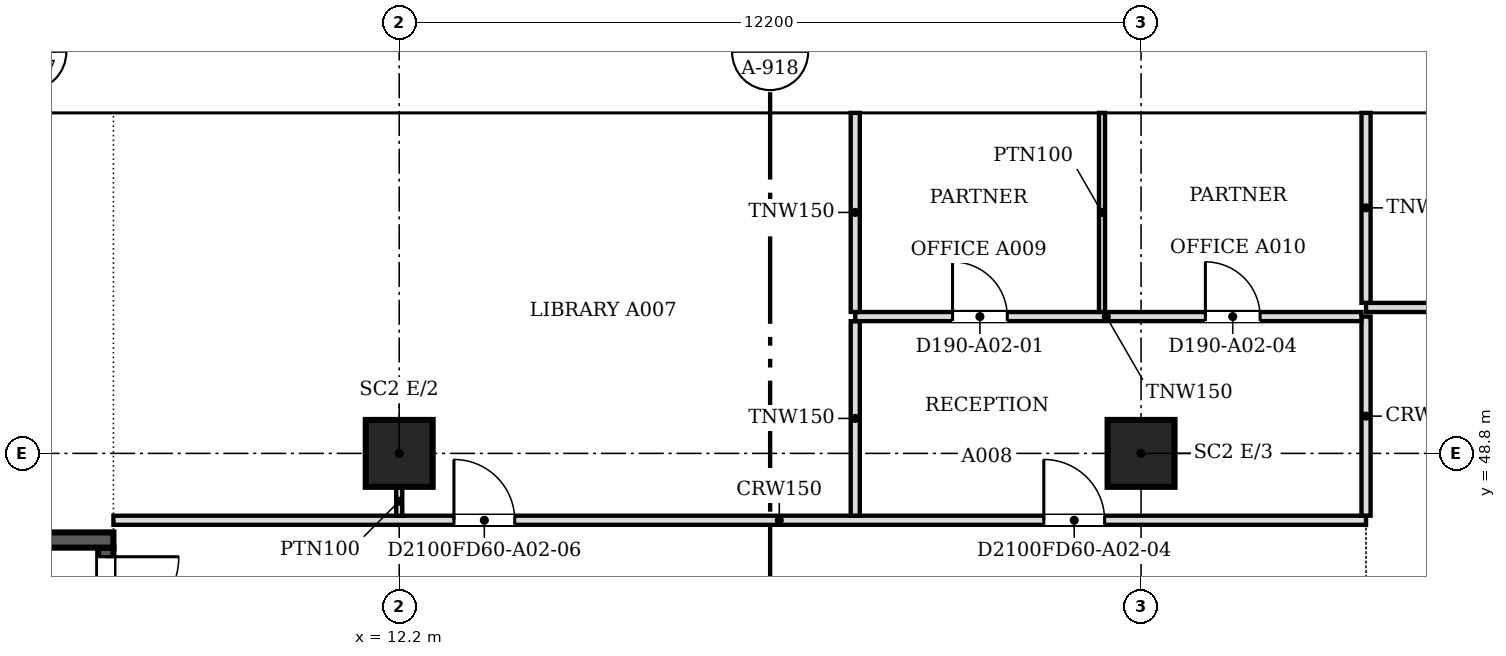
"""IFC4 building model, lengths in metres.
Left out: names, types, materials, properties, quantities, classifications, styles, units other than length and angle.
Written with IfcOpenShell. Run it as: python <this file> out.ifc"""

import sys

from ifc_helpers import new_model, si_unit, direction, frame, frame_2d, origin, origin_2d, place, context, subcontext, project, spatial, polyline, rectangle, outline, extrude, faceted_brep, source, transform, mapped, element, fill, save


model = new_model("IFC4")
c1 = context("Model", 3, precision=1e-05, world=origin(), true_north=direction((0.0, 1.0)))
c2 = subcontext(c1, "Body", "Model", "MODEL_VIEW")
j1 = project(units=[si_unit("LENGTHUNIT", "METRE"), si_unit("PLANEANGLEUNIT", "RADIAN")], contexts=[c1])
p1 = place(None, origin())
s1 = spatial("IfcSite", under=j1, at=p1, CompositionType="ELEMENT")
p2 = place(p1, origin())
s2 = spatial("IfcBuilding", under=s1, at=p2, CompositionType="ELEMENT")
p3 = place(p2, frame((0.0, 0.0, 33.4)))
s3 = spatial("IfcBuildingStorey", under=s2, at=p3, CompositionType="ELEMENT", Elevation=33.4)
for number, where, z_axis, x_axis in (
    (1, (12.2, 48.8, 0.0), (0.0, 0.0, 1.0), (1.0, 0.0, 0.0)),
    (2, (24.4, 48.8, 0.0), (0.0, 0.0, 1.0), (1.0, 0.0, 0.0)),
):
    element("IfcColumn", number, at=place(p3, frame(where, z_axis=z_axis, x_axis=x_axis)), inside=s3, PredefinedType="COLUMN", context=c2, shape_type="SweptSolid", body=[
        extrude(rectangle(XDim=1.1, YDim=1.1, at=origin_2d()), origin(), (0.0, 0.0, 1.0), 3.6),
    ])
m1 = source(origin(), c2, "Body", "SweptSolid", [
    extrude(outline(polyline([(3.05, 0.0), (6.1, 3.8), (3.05, 7.6), (0.0, 3.8), (3.05, 0.0)])), frame((0.0, 0.25, 0.0), z_axis=(0.0, -1.0, 0.0), x_axis=(1.0, 0.0, 0.0)), (0.0, 0.0, 1.0), 0.5),
])
p4 = place(p3, frame((33.55, 54.65, -3.8), z_axis=(0.0, 0.0, 1.0), x_axis=(-1.0, 0.0, 0.0)))
e3 = element("IfcWall", 3, at=p4, inside=s3, PredefinedType="SOLIDWALL", context=c2, shape_type="MappedRepresentation", body=[
    mapped(m1, transform((0.0, 0.0, 0.0), scale=1.0)),
])
m2 = source(origin(), c2, "Body", "SweptSolid", [
    extrude(outline(polyline([(3.05, 0.399), (5.78, 3.8), (3.05, 7.2), (0.321, 3.8), (3.05, 0.399)])), frame((0.0, 0.26, 0.0), z_axis=(0.0, -1.0, 0.0), x_axis=(1.0, 0.0, 0.0)), (0.0, 0.0, 1.0), 0.52),
])
p5 = place(p4, origin())
e4 = element("IfcOpeningElement", 4, at=p5, cuts=e3, PredefinedType="OPENING", context=c2, shape_type="MappedRepresentation", body=[
    mapped(m2, transform((0.0, 0.0, 0.0), scale=1.0)),
])
m3 = source(origin(), c2, "Body", "Brep", [
    faceted_brep([(3.05, -0.25, 0.0), (6.1, -0.25, 3.8), (6.1, -0.25, 3.8), (3.05, -0.25, 7.6), (0.0, -0.25, 3.8), (0.0, 0.25, 3.8), (3.05, 0.25, 7.6), (6.1, 0.25, 3.8), (6.1, 0.25, 3.8), (3.05, 0.25, 0.0)], [[[0, 1, 2, 3, 4]], [[5, 6, 7, 8, 9]], [[9, 8, 1, 0]], [[7, 6, 3, 2]], [[6, 5, 4, 3]], [[5, 9, 0, 4]], [[1, 8, 7, 2]]]),
])
p6 = place(p3, frame((27.45, 54.65, -3.8), z_axis=(0.0, 0.0, 1.0), x_axis=(-1.0, 0.0, 0.0)))
e5 = element("IfcWall", 5, at=p6, inside=s3, PredefinedType="SOLIDWALL", context=c2, shape_type="MappedRepresentation", body=[
    mapped(m3, transform((0.0, 0.0, 0.0), scale=1.0)),
])
p7 = place(p6, origin())
e6 = element("IfcOpeningElement", 6, at=p7, cuts=e5, PredefinedType="OPENING", context=c2, shape_type="MappedRepresentation", body=[
    mapped(m2, transform((0.0, 0.0, 0.0), scale=1.0)),
])
p8 = place(p3, frame((21.35, 54.65, -3.8), z_axis=(0.0, 0.0, 1.0), x_axis=(-1.0, 0.0, 0.0)))
e7 = element("IfcWall", 7, at=p8, inside=s3, PredefinedType="SOLIDWALL", context=c2, shape_type="MappedRepresentation", body=[
    mapped(m1, transform((0.0, 0.0, 0.0), scale=1.0)),
])
p9 = place(p8, origin())
e8 = element("IfcOpeningElement", 8, at=p9, cuts=e7, PredefinedType="OPENING", context=c2, shape_type="MappedRepresentation", body=[
    mapped(m2, transform((0.0, 0.0, 0.0), scale=1.0)),
])
p10 = place(p3, frame((15.25, 54.65, -3.8), z_axis=(0.0, 0.0, 1.0), x_axis=(-1.0, 0.0, 0.0)))
e9 = element("IfcWall", 9, at=p10, inside=s3, PredefinedType="SOLIDWALL", context=c2, shape_type="MappedRepresentation", body=[
    mapped(m1, transform((0.0, 0.0, 0.0), scale=1.0)),
])
p11 = place(p10, origin())
e10 = element("IfcOpeningElement", 10, at=p11, cuts=e9, PredefinedType="OPENING", context=c2, shape_type="MappedRepresentation", body=[
    mapped(m2, transform((0.0, 0.0, 0.0), scale=1.0)),
])
m4 = source(origin(), c2, "Body", "Brep", [
    faceted_brep([(3.003, -0.25, 0.0), (3.05, -0.25, 0.06), (3.05, -0.25, 7.54), (3.003, -0.25, 7.6), (0.0, -0.25, 3.8), (0.0, 0.25, 3.8), (2.957, 0.25, 7.541), (2.957, 0.25, 0.059), (3.003, 0.0, 0.0), (3.003, 0.0, 7.6)], [[[0, 1, 2, 3, 4]], [[5, 6, 7]], [[1, 0, 8]], [[9, 3, 2]], [[6, 5, 4, 3, 9]], [[5, 7, 8, 0, 4]], [[1, 8, 7, 6, 9, 2]]]),
])
p12 = place(p3, frame((9.15, 54.65, -3.8), z_axis=(0.0, 0.0, 1.0), x_axis=(-1.0, 0.0, 0.0)))
e11 = element("IfcWall", 11, at=p12, inside=s3, PredefinedType="SOLIDWALL", context=c2, shape_type="MappedRepresentation", body=[
    mapped(m4, transform((0.0, 0.0, 0.0), scale=1.0)),
])
m5 = source(origin(), c2, "Body", "SweptSolid", [
    extrude(outline(polyline([(2.803, 6.944), (0.319, 3.8), (2.803, 0.656), (2.803, 6.944)])), frame((0.0, 0.26, 0.0), z_axis=(0.0, -1.0, 0.0), x_axis=(1.0, 0.0, 0.0)), (0.0, 0.0, 1.0), 0.52),
])
p13 = place(p12, origin())
e12 = element("IfcOpeningElement", 12, at=p13, cuts=e11, PredefinedType="OPENING", context=c2, shape_type="MappedRepresentation", body=[
    mapped(m5, transform((0.0, 0.0, 0.0), scale=1.0)),
])
p14 = place(p2, frame((0.0, 0.0, 37.2)))
s4 = spatial("IfcBuildingStorey", under=s2, at=p14, CompositionType="ELEMENT", Elevation=37.2)
m6 = source(origin(), c2, "Body", "SweptSolid", [
    extrude(outline(polyline([(3.05, 0.0), (6.1, 3.8), (3.05, 7.6), (0.0, 3.8), (3.05, 0.0)])), frame((0.0, 0.25, 0.0), z_axis=(0.0, -1.0, 0.0), x_axis=(1.0, 0.0, 0.0)), (0.0, 0.0, 1.0), 0.5),
])
p15 = place(p14, frame((30.5, 54.65, -3.8), z_axis=(0.0, 0.0, 1.0), x_axis=(-1.0, 0.0, 0.0)))
e13 = element("IfcWall", 13, at=p15, inside=s4, PredefinedType="SOLIDWALL", context=c2, shape_type="MappedRepresentation", body=[
    mapped(m6, transform((0.0, 0.0, 0.0), scale=1.0)),
])
m7 = source(origin(), c2, "Body", "SweptSolid", [
    extrude(outline(polyline([(3.05, 0.399), (5.78, 3.8), (3.05, 7.201), (0.321, 3.8), (3.05, 0.399)])), frame((0.0, 0.26, 0.0), z_axis=(0.0, -1.0, 0.0), x_axis=(1.0, 0.0, 0.0)), (0.0, 0.0, 1.0), 0.52),
])
p16 = place(p15, origin())
e14 = element("IfcOpeningElement", 14, at=p16, cuts=e13, PredefinedType="OPENING", context=c2, shape_type="MappedRepresentation", body=[
    mapped(m7, transform((0.0, 0.0, 0.0), scale=1.0)),
])
m8 = source(origin(), c2, "Body", "Brep", [
    faceted_brep([(3.05, -0.25, 0.0), (6.1, -0.25, 3.8), (6.1, -0.25, 3.8), (3.05, -0.25, 7.6), (0.0, -0.25, 3.8), (0.0, 0.25, 3.8), (3.05, 0.25, 7.6), (6.1, 0.25, 3.8), (6.1, 0.25, 3.8), (3.05, 0.25, 0.0)], [[[0, 1, 2, 3, 4]], [[5, 6, 7, 8, 9]], [[9, 8, 1, 0]], [[7, 6, 3, 2]], [[6, 5, 4, 3]], [[5, 9, 0, 4]], [[1, 8, 7, 2]]]),
])
p17 = place(p14, frame((24.4, 54.65, -3.8), z_axis=(0.0, 0.0, 1.0), x_axis=(-1.0, 0.0, 0.0)))
e15 = element("IfcWall", 15, at=p17, inside=s4, PredefinedType="SOLIDWALL", context=c2, shape_type="MappedRepresentation", body=[
    mapped(m8, transform((0.0, 0.0, 0.0), scale=1.0)),
])
p18 = place(p17, origin())
e16 = element("IfcOpeningElement", 16, at=p18, cuts=e15, PredefinedType="OPENING", context=c2, shape_type="MappedRepresentation", body=[
    mapped(m7, transform((0.0, 0.0, 0.0), scale=1.0)),
])
p19 = place(p14, frame((18.3, 54.65, -3.8), z_axis=(0.0, 0.0, 1.0), x_axis=(-1.0, 0.0, 0.0)))
e17 = element("IfcWall", 17, at=p19, inside=s4, PredefinedType="SOLIDWALL", context=c2, shape_type="MappedRepresentation", body=[
    mapped(m6, transform((0.0, 0.0, 0.0), scale=1.0)),
])
p20 = place(p19, origin())
e18 = element("IfcOpeningElement", 18, at=p20, cuts=e17, PredefinedType="OPENING", context=c2, shape_type="MappedRepresentation", body=[
    mapped(m7, transform((0.0, 0.0, 0.0), scale=1.0)),
])
m9 = source(origin(), c2, "Body", "Brep", [
    faceted_brep([(3.05, -0.25, 0.0), (6.053, -0.25, 3.8), (3.05, -0.25, 7.6), (0.0, -0.25, 3.8), (0.0, 0.25, 3.8), (3.05, 0.25, 7.6), (6.007, 0.25, 3.859), (6.007, 0.25, 3.741), (3.05, 0.25, 0.0), (6.053, 0.0, 3.8)], [[[0, 1, 2, 3]], [[4, 5, 6, 7, 8]], [[8, 7, 9, 1, 0]], [[6, 5, 2, 1, 9]], [[5, 4, 3, 2]], [[4, 8, 0, 3]], [[9, 7, 6]]]),
])
p21 = place(p14, frame((12.2, 54.65, -3.8), z_axis=(0.0, 0.0, 1.0), x_axis=(-1.0, 0.0, 0.0)))
e19 = element("IfcWall", 19, at=p21, inside=s4, PredefinedType="SOLIDWALL", context=c2, shape_type="MappedRepresentation", body=[
    mapped(m9, transform((0.0, 0.0, 0.0), scale=1.0)),
])
m10 = source(origin(), c2, "Body", "SweptSolid", [
    extrude(outline(polyline([(3.049, 0.401), (5.735, 3.8), (3.049, 7.199), (0.321, 3.8), (3.049, 0.401)])), frame((0.0, 0.26, 0.0), z_axis=(0.0, -1.0, 0.0), x_axis=(1.0, 0.0, 0.0)), (0.0, 0.0, 1.0), 0.52),
])
p22 = place(p21, origin())
e20 = element("IfcOpeningElement", 20, at=p22, cuts=e19, PredefinedType="OPENING", context=c2, shape_type="MappedRepresentation", body=[
    mapped(m10, transform((0.0, 0.0, 0.0), scale=1.0)),
])
p23 = place(p3, frame((3.6, 47.375, 0.0), z_axis=(0.0, 0.0, 1.0), x_axis=(1.0, 0.0, 0.0)))
e21 = element("IfcWall", 21, at=p23, inside=s3, PredefinedType="SOLIDWALL", context=c2, shape_type="SweptSolid", body=[
    extrude(rectangle(XDim=3.9, YDim=0.25, at=frame_2d((1.95, 0.0))), origin(), (0.0, 0.0, 1.0), 3.8),
])
p24 = place(p3, frame((7.375, 47.25, 0.0), z_axis=(0.0, 0.0, 1.0), x_axis=(0.0, -1.0, 0.0)))
e22 = element("IfcWall", 22, at=p24, inside=s3, PredefinedType="SOLIDWALL", context=c2, shape_type="SweptSolid", body=[
    extrude(rectangle(XDim=8.0, YDim=0.25, at=frame_2d((4.0, 0.0))), origin(), (0.0, 0.0, 1.0), 3.8),
])
m11 = source(origin(), c2, "Body", "SweptSolid", [
    extrude(rectangle(XDim=1.2, YDim=2.1, at=frame_2d((0.6, 1.05))), frame((0.0, 0.135, 0.0), z_axis=(0.0, -1.0, 0.0), x_axis=(1.0, 0.0, 0.0)), (0.0, 0.0, 1.0), 0.27),
])
p25 = place(p24, frame((0.15, 0.0, 0.0)))
e23 = element("IfcOpeningElement", 23, at=p25, cuts=e22, PredefinedType="OPENING", context=c2, shape_type="MappedRepresentation", body=[
    mapped(m11, transform((0.0, 0.0, 0.0), scale=1.0)),
])
p26 = place(p3, frame((7.5, 47.7, 0.0), z_axis=(0.0, 0.0, 1.0), x_axis=(1.0, 0.0, 0.0)))
e24 = element("IfcWall", 24, at=p26, inside=s3, PredefinedType="PARTITIONING", context=c2, shape_type="SweptSolid", body=[
    extrude(rectangle(XDim=20.6, YDim=0.15, at=frame_2d((10.3, 0.0))), origin(), (0.0, 0.0, 1.0), 3.067),
])
m12 = source(origin(), c2, "Body", "SweptSolid", [
    extrude(rectangle(XDim=1.0, YDim=2.1, at=frame_2d((0.5, 1.05))), frame((0.0, 0.085, 0.0), z_axis=(0.0, -1.0, 0.0), x_axis=(1.0, 0.0, 0.0)), (0.0, 0.0, 1.0), 0.17),
])
p27 = place(p26, frame((15.301, 0.0, 0.0)))
e25 = element("IfcOpeningElement", 25, at=p27, cuts=e24, PredefinedType="OPENING", context=c2, shape_type="MappedRepresentation", body=[
    mapped(m12, transform((0.0, 0.0, 0.0), scale=1.0)),
])
p28 = place(p26, frame((5.6, 0.0, 0.0)))
e26 = element("IfcOpeningElement", 26, at=p28, cuts=e24, PredefinedType="OPENING", context=c2, shape_type="MappedRepresentation", body=[
    mapped(m12, transform((0.0, 0.0, 0.0), scale=1.0)),
])
p29 = place(p3, frame((19.7, 47.776, 0.0), z_axis=(0.0, 0.0, 1.0), x_axis=(0.0, 1.0, 0.0)))
e27 = element("IfcWall", 27, at=p29, inside=s3, PredefinedType="PARTITIONING", context=c2, shape_type="SweptSolid", body=[
    extrude(rectangle(XDim=3.198, YDim=0.15, at=frame_2d((1.599, 0.0))), origin(), (0.0, 0.0, 1.0), 3.067),
])
p30 = place(p3, frame((28.1, 47.776, 0.0), z_axis=(0.0, 0.0, 1.0), x_axis=(0.0, 1.0, 0.0)))
e28 = element("IfcWall", 28, at=p30, inside=s3, PredefinedType="PARTITIONING", context=c2, shape_type="SweptSolid", body=[
    extrude(rectangle(XDim=3.274, YDim=0.15, at=frame_2d((1.637, 0.0))), origin(), (0.0, 0.0, 1.0), 3.067),
])
p31 = place(p3, frame((12.2, 48.25, 0.0), z_axis=(0.0, 0.0, 1.0), x_axis=(0.0, -1.0, 0.0)))
e29 = element("IfcWall", 29, at=p31, inside=s3, PredefinedType="PARTITIONING", context=c2, shape_type="SweptSolid", body=[
    extrude(rectangle(XDim=0.475, YDim=0.1, at=frame_2d((0.238, 0.0))), origin(), (0.0, 0.0, 1.0), 3.067),
])
p32 = place(p3, frame((19.7, 51.05, 0.0), z_axis=(0.0, 0.0, 1.0), x_axis=(1.0, 0.0, 0.0)))
e30 = element("IfcWall", 30, at=p32, inside=s3, PredefinedType="PARTITIONING", context=c2, shape_type="SweptSolid", body=[
    extrude(rectangle(XDim=8.324, YDim=0.15, at=frame_2d((4.162, 0.0))), origin(), (0.0, 0.0, 1.0), 3.067),
])
m13 = source(origin(), c2, "Body", "SweptSolid", [
    extrude(rectangle(XDim=0.9, YDim=2.1, at=frame_2d((0.45, 1.05))), frame((0.0, 0.085, 0.0), z_axis=(0.0, -1.0, 0.0), x_axis=(1.0, 0.0, 0.0)), (0.0, 0.0, 1.0), 0.17),
])
p33 = place(p32, frame((1.6, 0.0, 0.0)))
e31 = element("IfcOpeningElement", 31, at=p33, cuts=e30, PredefinedType="OPENING", context=c2, shape_type="MappedRepresentation", body=[
    mapped(m13, transform((0.0, 0.0, 0.0), scale=1.0)),
])
p34 = place(p32, frame((5.758, 0.0, 0.0)))
e32 = element("IfcOpeningElement", 32, at=p34, cuts=e30, PredefinedType="OPENING", context=c2, shape_type="MappedRepresentation", body=[
    mapped(m13, transform((0.0, 0.0, 0.0), scale=1.0)),
])
p35 = place(p3, frame((19.7, 51.126, 0.0), z_axis=(0.0, 0.0, 1.0), x_axis=(0.0, 1.0, 0.0)))
e33 = element("IfcWall", 33, at=p35, inside=s3, PredefinedType="PARTITIONING", context=c2, shape_type="SweptSolid", body=[
    extrude(rectangle(XDim=3.274, YDim=0.15, at=frame_2d((1.637, 0.0))), origin(), (0.0, 0.0, 1.0), 3.067),
])
p36 = place(p3, frame((23.758, 51.126, 0.0), z_axis=(0.0, 0.0, 1.0), x_axis=(0.0, 1.0, 0.0)))
e34 = element("IfcWall", 34, at=p36, inside=s3, PredefinedType="PARTITIONING", context=c2, shape_type="SweptSolid", body=[
    extrude(rectangle(XDim=3.274, YDim=0.1, at=frame_2d((1.637, 0.0))), origin(), (0.0, 0.0, 1.0), 3.067),
])
p37 = place(p3, frame((28.1, 51.2, 0.0), z_axis=(0.0, 0.0, 1.0), x_axis=(1.0, 0.0, 0.0)))
e35 = element("IfcWall", 35, at=p37, inside=s3, PredefinedType="PARTITIONING", context=c2, shape_type="SweptSolid", body=[
    extrude(rectangle(XDim=31.438, YDim=0.15, at=frame_2d((15.719, 0.0))), origin(), (0.0, 0.0, 1.0), 3.067),
])
p38 = place(p37, frame((27.501, 0.0, 0.0)))
e36 = element("IfcOpeningElement", 36, at=p38, cuts=e35, PredefinedType="OPENING", context=c2, shape_type="MappedRepresentation", body=[
    mapped(m13, transform((0.0, 0.0, 0.0), scale=1.0)),
])
p39 = place(p37, frame((5.6, 0.0, 0.0)))
e37 = element("IfcOpeningElement", 37, at=p39, cuts=e35, PredefinedType="OPENING", context=c2, shape_type="MappedRepresentation", body=[
    mapped(m13, transform((0.0, 0.0, 0.0), scale=1.0)),
])
p40 = place(p37, frame((17.8, 0.0, 0.0)))
e38 = element("IfcOpeningElement", 38, at=p40, cuts=e35, PredefinedType="OPENING", context=c2, shape_type="MappedRepresentation", body=[
    mapped(m13, transform((0.0, 0.0, 0.0), scale=1.0)),
])
p41 = place(p3, frame((28.1, 51.276, 0.0), z_axis=(0.0, 0.0, 1.0), x_axis=(0.0, 1.0, 0.0)))
e39 = element("IfcWall", 39, at=p41, inside=s3, PredefinedType="PARTITIONING", context=c2, shape_type="SweptSolid", body=[
    extrude(rectangle(XDim=3.124, YDim=0.15, at=frame_2d((1.562, 0.0))), origin(), (0.0, 0.0, 1.0), 3.067),
])
m14 = source(origin(), c2, "Body", "SweptSolid", [
    extrude(rectangle(XDim=1.2, YDim=2.1, at=frame_2d((0.6, 1.05))), frame((0.0, 0.025, 0.0), z_axis=(0.0, -1.0, 0.0), x_axis=(1.0, 0.0, 0.0)), (0.0, 0.0, 1.0), 0.05),
])
p42 = place(p25, origin())
e40 = element("IfcDoor", 40, at=p42, inside=s3, OperationType="SINGLE_SWING_LEFT", PredefinedType="DOOR", context=c2, shape_type="MappedRepresentation", body=[
    mapped(m14, transform((0.0, 0.0, 0.0), scale=1.0)),
])
fill(e23, e40)
m15 = source(origin(), c2, "Body", "SweptSolid", [
    extrude(rectangle(XDim=0.9, YDim=2.1, at=frame_2d((0.45, 1.05))), frame((0.0, 0.025, 0.0), z_axis=(0.0, -1.0, 0.0), x_axis=(1.0, 0.0, 0.0)), (0.0, 0.0, 1.0), 0.05),
])
p43 = place(p33, origin())
e41 = element("IfcDoor", 41, at=p43, inside=s3, OperationType="SINGLE_SWING_LEFT", PredefinedType="DOOR", context=c2, shape_type="MappedRepresentation", body=[
    mapped(m15, transform((0.0, 0.0, 0.0), scale=1.0)),
])
fill(e31, e41)
p44 = place(p34, origin())
e42 = element("IfcDoor", 42, at=p44, inside=s3, OperationType="SINGLE_SWING_LEFT", PredefinedType="DOOR", context=c2, shape_type="MappedRepresentation", body=[
    mapped(m15, transform((0.0, 0.0, 0.0), scale=1.0)),
])
fill(e32, e42)
m16 = source(origin(), c2, "Body", "SweptSolid", [
    extrude(rectangle(XDim=1.0, YDim=2.1, at=frame_2d((0.5, 1.05))), frame((0.0, 0.025, 0.0), z_axis=(0.0, -1.0, 0.0), x_axis=(1.0, 0.0, 0.0)), (0.0, 0.0, 1.0), 0.05),
])
p45 = place(p27, origin())
e43 = element("IfcDoor", 43, at=p45, inside=s3, OperationType="SINGLE_SWING_LEFT", PredefinedType="DOOR", context=c2, shape_type="MappedRepresentation", body=[
    mapped(m16, transform((0.0, 0.0, 0.0), scale=1.0)),
])
fill(e25, e43)
p46 = place(p28, origin())
e44 = element("IfcDoor", 44, at=p46, inside=s3, OperationType="SINGLE_SWING_LEFT", PredefinedType="DOOR", context=c2, shape_type="MappedRepresentation", body=[
    mapped(m16, transform((0.0, 0.0, 0.0), scale=1.0)),
])
fill(e26, e44)
save(model, sys.argv[1])
